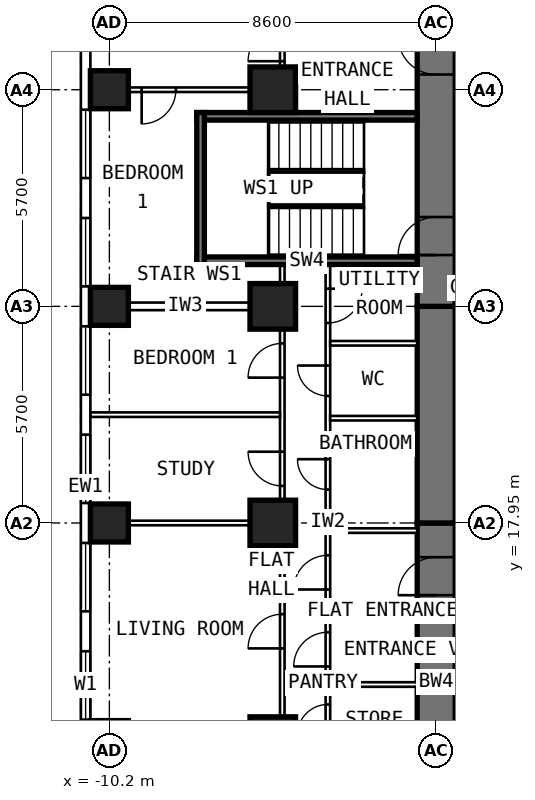
"""IFC4 building model, lengths in metres.
Left out: names, types, materials, properties, quantities, classifications, styles, units other than length and angle.
Written with IfcOpenShell. Run it as: python <this file> out.ifc"""

import sys

from ifc_helpers import new_model, si_unit, direction, frame, frame_2d, origin, origin_2d, place, context, subcontext, project, spatial, rectangle, extrude, element, fill, save


model = new_model("IFC4")
c1 = context("Model", 3, precision=1e-05, world=origin(), true_north=direction((0.0, 1.0)))
c2 = subcontext(c1, "Body", "Model", "MODEL_VIEW")
j1 = project(units=[si_unit("LENGTHUNIT", "METRE"), si_unit("PLANEANGLEUNIT", "RADIAN")], contexts=[c1])
p1 = place(None, origin())
s1 = spatial("IfcSite", under=j1, at=p1, CompositionType="ELEMENT")
p2 = place(p1, origin())
s2 = spatial("IfcBuilding", under=s1, at=p2, CompositionType="ELEMENT")
p3 = place(p2, frame((0.0, 0.0, 57.4)))
s3 = spatial("IfcBuildingStorey", under=s2, at=p3, CompositionType="ELEMENT", Elevation=57.4)
for number, where, z_axis, x_axis in (
    (1, (-10.2, 17.95, 0.0), (0.0, 0.0, 1.0), (0.0, 1.0, 0.0)),
    (2, (-10.2, 23.65, 0.0), (0.0, 0.0, 1.0), (0.0, 1.0, 0.0)),
    (3, (-10.2, 29.35, 0.0), (0.0, 0.0, 1.0), (0.0, 1.0, 0.0)),
):
    element("IfcColumn", number, at=place(p3, frame(where, z_axis=z_axis, x_axis=x_axis)), inside=s3, PredefinedType="COLUMN", context=c2, shape_type="SweptSolid", body=[
        extrude(rectangle(XDim=1.0, YDim=1.0, at=origin_2d()), origin(), (0.0, 0.0, 1.0), 3.6),
    ])
for number, where, z_axis, x_axis in (
    (4, (-5.9, 12.25, 0.0), (0.0, 0.0, 1.0), (0.0, 1.0, 0.0)),
    (5, (-5.9, 17.95, 0.0), (0.0, 0.0, 1.0), (0.0, 1.0, 0.0)),
    (6, (-5.9, 23.65, 0.0), (0.0, 0.0, 1.0), (0.0, 1.0, 0.0)),
    (7, (-5.9, 29.35, 0.0), (0.0, 0.0, 1.0), (0.0, 1.0, 0.0)),
):
    element("IfcColumn", number, at=place(p3, frame(where, z_axis=z_axis, x_axis=x_axis)), inside=s3, PredefinedType="COLUMN", context=c2, shape_type="SweptSolid", body=[
        extrude(rectangle(XDim=1.2, YDim=1.2, at=origin_2d()), origin(), (0.0, 0.0, 1.0), 3.6),
    ])
p4 = place(p3, frame((-1.6, 9.6, 0.0), z_axis=(0.0, 0.0, 1.0), x_axis=(0.0, 1.0, 0.0)))
e8 = element("IfcWall", 8, at=p4, inside=s3, PredefinedType="SHEAR", context=c2, shape_type="SweptSolid", body=[
    extrude(rectangle(XDim=8.35, YDim=1.0, at=frame_2d((4.175, 0.0))), origin(), (0.0, 0.0, 1.0), 3.6),
])
p5 = place(p4, frame((6.45, 0.0, 0.0)))
e9 = element("IfcOpeningElement", 9, at=p5, cuts=e8, PredefinedType="OPENING", context=c2, shape_type="SweptSolid", body=[
    extrude(rectangle(XDim=1.0, YDim=2.1, at=frame_2d((0.5, 1.05))), frame((0.0, 0.512, 0.0), z_axis=(0.0, -1.0, 0.0), x_axis=(1.0, 0.0, 0.0)), (0.0, 0.0, 1.0), 1.024),
])
p6 = place(p3, frame((-1.6, 17.95, 0.0), z_axis=(0.0, 0.0, 1.0), x_axis=(0.0, 1.0, 0.0)))
e10 = element("IfcWall", 10, at=p6, inside=s3, PredefinedType="SHEAR", context=c2, shape_type="SweptSolid", body=[
    extrude(rectangle(XDim=5.7, YDim=1.0, at=frame_2d((2.85, 0.0))), origin(), (0.0, 0.0, 1.0), 3.6),
])
p7 = place(p3, frame((-1.6, 23.65, 0.0), z_axis=(0.0, 0.0, 1.0), x_axis=(0.0, 1.0, 0.0)))
e11 = element("IfcWall", 11, at=p7, inside=s3, PredefinedType="SHEAR", context=c2, shape_type="SweptSolid", body=[
    extrude(rectangle(XDim=10.745, YDim=1.0, at=frame_2d((5.373, 0.0))), origin(), (0.0, 0.0, 1.0), 3.6),
])
p8 = place(p7, frame((6.1, 0.0, 0.0)))
e12 = element("IfcOpeningElement", 12, at=p8, cuts=e11, PredefinedType="OPENING", context=c2, shape_type="SweptSolid", body=[
    extrude(rectangle(XDim=1.0, YDim=2.1, at=frame_2d((0.5, 1.05))), frame((0.0, 0.512, 0.0), z_axis=(0.0, -1.0, 0.0), x_axis=(1.0, 0.0, 0.0)), (0.0, 0.0, 1.0), 1.024),
])
p9 = place(p7, frame((1.35, 0.0, 0.0)))
e13 = element("IfcOpeningElement", 13, at=p9, cuts=e11, PredefinedType="OPENING", context=c2, shape_type="SweptSolid", body=[
    extrude(rectangle(XDim=1.0, YDim=2.1, at=frame_2d((0.5, 1.05))), frame((0.0, 0.512, 0.0), z_axis=(0.0, -1.0, 0.0), x_axis=(1.0, 0.0, 0.0)), (0.0, 0.0, 1.0), 1.024),
])
p10 = place(p3, frame((-10.825, 6.148, 0.0), z_axis=(0.0, 0.0, 1.0), x_axis=(0.0, 1.0, 0.0)))
e14 = element("IfcWall", 14, at=p10, inside=s3, PredefinedType="SOLIDWALL", context=c2, shape_type="SweptSolid", body=[
    extrude(rectangle(XDim=25.487, YDim=0.25, at=frame_2d((12.744, 0.0))), origin(), (0.0, 0.0, 1.0), 3.35),
])
p11 = place(p10, frame((0.927, 0.0, 0.8)))
e15 = element("IfcOpeningElement", 15, at=p11, cuts=e14, PredefinedType="OPENING", context=c2, shape_type="SweptSolid", body=[
    extrude(rectangle(XDim=1.8, YDim=1.8, at=frame_2d((0.9, 0.9))), frame((0.0, 0.137, 0.0), z_axis=(0.0, -1.0, 0.0), x_axis=(1.0, 0.0, 0.0)), (0.0, 0.0, 1.0), 0.274),
])
p12 = place(p10, frame((3.777, 0.0, 0.8)))
e16 = element("IfcOpeningElement", 16, at=p12, cuts=e14, PredefinedType="OPENING", context=c2, shape_type="SweptSolid", body=[
    extrude(rectangle(XDim=1.8, YDim=1.8, at=frame_2d((0.9, 0.9))), frame((0.0, 0.137, 0.0), z_axis=(0.0, -1.0, 0.0), x_axis=(1.0, 0.0, 0.0)), (0.0, 0.0, 1.0), 0.274),
])
p13 = place(p10, frame((6.627, 0.0, 0.8)))
e17 = element("IfcOpeningElement", 17, at=p13, cuts=e14, PredefinedType="OPENING", context=c2, shape_type="SweptSolid", body=[
    extrude(rectangle(XDim=1.8, YDim=1.8, at=frame_2d((0.9, 0.9))), frame((0.0, 0.137, 0.0), z_axis=(0.0, -1.0, 0.0), x_axis=(1.0, 0.0, 0.0)), (0.0, 0.0, 1.0), 0.274),
])
p14 = place(p10, frame((9.477, 0.0, 0.8)))
e18 = element("IfcOpeningElement", 18, at=p14, cuts=e14, PredefinedType="OPENING", context=c2, shape_type="SweptSolid", body=[
    extrude(rectangle(XDim=1.8, YDim=1.8, at=frame_2d((0.9, 0.9))), frame((0.0, 0.137, 0.0), z_axis=(0.0, -1.0, 0.0), x_axis=(1.0, 0.0, 0.0)), (0.0, 0.0, 1.0), 0.274),
])
p15 = place(p10, frame((12.327, 0.0, 0.8)))
e19 = element("IfcOpeningElement", 19, at=p15, cuts=e14, PredefinedType="OPENING", context=c2, shape_type="SweptSolid", body=[
    extrude(rectangle(XDim=1.8, YDim=1.8, at=frame_2d((0.9, 0.9))), frame((0.0, 0.137, 0.0), z_axis=(0.0, -1.0, 0.0), x_axis=(1.0, 0.0, 0.0)), (0.0, 0.0, 1.0), 0.274),
])
p16 = place(p10, frame((15.177, 0.0, 0.8)))
e20 = element("IfcOpeningElement", 20, at=p16, cuts=e14, PredefinedType="OPENING", context=c2, shape_type="SweptSolid", body=[
    extrude(rectangle(XDim=1.8, YDim=1.8, at=frame_2d((0.9, 0.9))), frame((0.0, 0.137, 0.0), z_axis=(0.0, -1.0, 0.0), x_axis=(1.0, 0.0, 0.0)), (0.0, 0.0, 1.0), 0.274),
])
p17 = place(p10, frame((18.027, 0.0, 0.8)))
e21 = element("IfcOpeningElement", 21, at=p17, cuts=e14, PredefinedType="OPENING", context=c2, shape_type="SweptSolid", body=[
    extrude(rectangle(XDim=1.8, YDim=1.8, at=frame_2d((0.9, 0.9))), frame((0.0, 0.137, 0.0), z_axis=(0.0, -1.0, 0.0), x_axis=(1.0, 0.0, 0.0)), (0.0, 0.0, 1.0), 0.274),
])
p18 = place(p10, frame((20.877, 0.0, 0.8)))
e22 = element("IfcOpeningElement", 22, at=p18, cuts=e14, PredefinedType="OPENING", context=c2, shape_type="SweptSolid", body=[
    extrude(rectangle(XDim=1.8, YDim=1.8, at=frame_2d((0.9, 0.9))), frame((0.0, 0.137, 0.0), z_axis=(0.0, -1.0, 0.0), x_axis=(1.0, 0.0, 0.0)), (0.0, 0.0, 1.0), 0.274),
])
p19 = place(p3, frame((-4.45, 10.1, 0.0), z_axis=(0.0, 0.0, 1.0), x_axis=(0.0, 1.0, 0.0)))
e23 = element("IfcWall", 23, at=p19, inside=s3, PredefinedType="PARTITIONING", context=c2, shape_type="SweptSolid", body=[
    extrude(rectangle(XDim=14.65, YDim=0.12, at=frame_2d((7.325, 0.0))), origin(), (0.0, 0.0, 1.0), 3.35),
])
p20 = place(p19, frame((0.375, 0.0, 0.0)))
e24 = element("IfcOpeningElement", 24, at=p20, cuts=e23, PredefinedType="OPENING", context=c2, shape_type="SweptSolid", body=[
    extrude(rectangle(XDim=0.9, YDim=2.1, at=frame_2d((0.45, 1.05))), frame((0.0, 0.072, 0.0), z_axis=(0.0, -1.0, 0.0), x_axis=(1.0, 0.0, 0.0)), (0.0, 0.0, 1.0), 0.144),
])
p21 = place(p19, frame((2.275, 0.0, 0.0)))
e25 = element("IfcOpeningElement", 25, at=p21, cuts=e23, PredefinedType="OPENING", context=c2, shape_type="SweptSolid", body=[
    extrude(rectangle(XDim=0.8, YDim=2.1, at=frame_2d((0.4, 1.05))), frame((0.0, 0.072, 0.0), z_axis=(0.0, -1.0, 0.0), x_axis=(1.0, 0.0, 0.0)), (0.0, 0.0, 1.0), 0.144),
])
p22 = place(p19, frame((4.075, 0.0, 0.0)))
e26 = element("IfcOpeningElement", 26, at=p22, cuts=e23, PredefinedType="OPENING", context=c2, shape_type="SweptSolid", body=[
    extrude(rectangle(XDim=0.9, YDim=2.1, at=frame_2d((0.45, 1.05))), frame((0.0, 0.072, 0.0), z_axis=(0.0, -1.0, 0.0), x_axis=(1.0, 0.0, 0.0)), (0.0, 0.0, 1.0), 0.144),
])
p23 = place(p19, frame((6.1, 0.0, 0.0)))
e27 = element("IfcOpeningElement", 27, at=p23, cuts=e23, PredefinedType="OPENING", context=c2, shape_type="SweptSolid", body=[
    extrude(rectangle(XDim=0.9, YDim=2.1, at=frame_2d((0.45, 1.05))), frame((0.0, 0.072, 0.0), z_axis=(0.0, -1.0, 0.0), x_axis=(1.0, 0.0, 0.0)), (0.0, 0.0, 1.0), 0.144),
])
p24 = place(p19, frame((8.729, 0.0, 0.0)))
e28 = element("IfcOpeningElement", 28, at=p24, cuts=e23, PredefinedType="OPENING", context=c2, shape_type="SweptSolid", body=[
    extrude(rectangle(XDim=0.8, YDim=2.1, at=frame_2d((0.4, 1.05))), frame((0.0, 0.072, 0.0), z_axis=(0.0, -1.0, 0.0), x_axis=(1.0, 0.0, 0.0)), (0.0, 0.0, 1.0), 0.144),
])
p25 = place(p19, frame((11.193, 0.0, 0.0)))
e29 = element("IfcOpeningElement", 29, at=p25, cuts=e23, PredefinedType="OPENING", context=c2, shape_type="SweptSolid", body=[
    extrude(rectangle(XDim=0.8, YDim=2.1, at=frame_2d((0.4, 1.05))), frame((0.0, 0.072, 0.0), z_axis=(0.0, -1.0, 0.0), x_axis=(1.0, 0.0, 0.0)), (0.0, 0.0, 1.0), 0.144),
])
p26 = place(p19, frame((13.114, 0.0, 0.0)))
e30 = element("IfcOpeningElement", 30, at=p26, cuts=e23, PredefinedType="OPENING", context=c2, shape_type="SweptSolid", body=[
    extrude(rectangle(XDim=0.9, YDim=2.1, at=frame_2d((0.45, 1.05))), frame((0.0, 0.072, 0.0), z_axis=(0.0, -1.0, 0.0), x_axis=(1.0, 0.0, 0.0)), (0.0, 0.0, 1.0), 0.144),
])
p27 = place(p3, frame((-5.65, 9.6, 0.0), z_axis=(0.0, 0.0, 1.0), x_axis=(0.0, 1.0, 0.0)))
e31 = element("IfcWall", 31, at=p27, inside=s3, PredefinedType="PARTITIONING", context=c2, shape_type="SweptSolid", body=[
    extrude(rectangle(XDim=15.15, YDim=0.12, at=frame_2d((7.575, 0.0))), origin(), (0.0, 0.0, 1.0), 3.35),
])
p28 = place(p27, frame((5.05, 0.0, 0.0)))
e32 = element("IfcOpeningElement", 32, at=p28, cuts=e31, PredefinedType="OPENING", context=c2, shape_type="SweptSolid", body=[
    extrude(rectangle(XDim=0.9, YDim=2.1, at=frame_2d((0.45, 1.05))), frame((0.0, 0.072, 0.0), z_axis=(0.0, -1.0, 0.0), x_axis=(1.0, 0.0, 0.0)), (0.0, 0.0, 1.0), 0.144),
])
p29 = place(p27, frame((9.325, 0.0, 0.0)))
e33 = element("IfcOpeningElement", 33, at=p29, cuts=e31, PredefinedType="OPENING", context=c2, shape_type="SweptSolid", body=[
    extrude(rectangle(XDim=0.9, YDim=2.1, at=frame_2d((0.45, 1.05))), frame((0.0, 0.072, 0.0), z_axis=(0.0, -1.0, 0.0), x_axis=(1.0, 0.0, 0.0)), (0.0, 0.0, 1.0), 0.144),
])
p30 = place(p27, frame((12.175, 0.0, 0.0)))
e34 = element("IfcOpeningElement", 34, at=p30, cuts=e31, PredefinedType="OPENING", context=c2, shape_type="SweptSolid", body=[
    extrude(rectangle(XDim=0.9, YDim=2.1, at=frame_2d((0.45, 1.05))), frame((0.0, 0.072, 0.0), z_axis=(0.0, -1.0, 0.0), x_axis=(1.0, 0.0, 0.0)), (0.0, 0.0, 1.0), 0.144),
])
p31 = place(p3, frame((-5.71, 17.95, 0.0), z_axis=(0.0, 0.0, 1.0), x_axis=(-1.0, 0.0, 0.0)))
e35 = element("IfcWall", 35, at=p31, inside=s3, PredefinedType="PARTITIONING", context=c2, shape_type="SweptSolid", body=[
    extrude(rectangle(XDim=4.99, YDim=0.12, at=frame_2d((2.495, 0.0))), origin(), (0.0, 0.0, 1.0), 2.45),
])
p32 = place(p3, frame((-5.71, 20.8, 0.0), z_axis=(0.0, 0.0, 1.0), x_axis=(-1.0, 0.0, 0.0)))
e36 = element("IfcWall", 36, at=p32, inside=s3, PredefinedType="PARTITIONING", context=c2, shape_type="SweptSolid", body=[
    extrude(rectangle(XDim=4.99, YDim=0.12, at=frame_2d((2.495, 0.0))), origin(), (0.0, 0.0, 1.0), 3.35),
])
for number, where, z_axis, x_axis in (
    (37, (-2.1, 13.7, 0.0), (0.0, 0.0, 1.0), (-1.0, 0.0, 0.0)),
    (38, (-2.1, 15.55, 0.0), (0.0, 0.0, 1.0), (-1.0, 0.0, 0.0)),
):
    element("IfcWall", number, at=place(p3, frame(where, z_axis=z_axis, x_axis=x_axis)), inside=s3, PredefinedType="PARTITIONING", context=c2, shape_type="SweptSolid", body=[
        extrude(rectangle(XDim=2.29, YDim=0.12, at=frame_2d((1.145, 0.0))), origin(), (0.0, 0.0, 1.0), 3.35),
    ])
p33 = place(p3, frame((-2.1, 17.75, 0.0), z_axis=(0.0, 0.0, 1.0), x_axis=(-1.0, 0.0, 0.0)))
e39 = element("IfcWall", 39, at=p33, inside=s3, PredefinedType="PARTITIONING", context=c2, shape_type="SweptSolid", body=[
    extrude(rectangle(XDim=2.29, YDim=0.12, at=frame_2d((1.145, 0.0))), origin(), (0.0, 0.0, 1.0), 2.45),
])
for number, where, z_axis, x_axis in (
    (40, (-2.1, 20.707, 0.0), (0.0, 0.0, 1.0), (-1.0, 0.0, 0.0)),
    (41, (-2.1, 22.678, 0.0), (0.0, 0.0, 1.0), (-1.0, 0.0, 0.0)),
):
    element("IfcWall", number, at=place(p3, frame(where, z_axis=z_axis, x_axis=x_axis)), inside=s3, PredefinedType="PARTITIONING", context=c2, shape_type="SweptSolid", body=[
        extrude(rectangle(XDim=2.29, YDim=0.12, at=frame_2d((1.145, 0.0))), origin(), (0.0, 0.0, 1.0), 3.35),
    ])
p34 = place(p3, frame((-5.71, 23.65, 0.0), z_axis=(0.0, 0.0, 1.0), x_axis=(-1.0, 0.0, 0.0)))
e42 = element("IfcWall", 42, at=p34, inside=s3, PredefinedType="PARTITIONING", context=c2, shape_type="SweptSolid", body=[
    extrude(rectangle(XDim=4.99, YDim=0.2, at=frame_2d((2.495, 0.0))), origin(), (0.0, 0.0, 1.0), 2.45),
])
p35 = place(p3, frame((-5.71, 29.35, 0.0), z_axis=(0.0, 0.0, 1.0), x_axis=(-1.0, 0.0, 0.0)))
e43 = element("IfcWall", 43, at=p35, inside=s3, PredefinedType="PARTITIONING", context=c2, shape_type="SweptSolid", body=[
    extrude(rectangle(XDim=4.99, YDim=0.12, at=frame_2d((2.495, 0.0))), origin(), (0.0, 0.0, 1.0), 2.45),
])
p36 = place(p35, frame((2.74, 0.0, 0.0)))
e44 = element("IfcOpeningElement", 44, at=p36, cuts=e43, PredefinedType="OPENING", context=c2, shape_type="SweptSolid", body=[
    extrude(rectangle(XDim=0.9, YDim=2.1, at=frame_2d((0.45, 1.05))), frame((0.0, 0.072, 0.0), z_axis=(0.0, -1.0, 0.0), x_axis=(1.0, 0.0, 0.0)), (0.0, 0.0, 1.0), 0.144),
])
p37 = place(p3, frame((-5.65, 28.95, 0.0), z_axis=(0.0, 0.0, 1.0), x_axis=(0.0, 1.0, 0.0)))
e45 = element("IfcWall", 45, at=p37, inside=s3, PredefinedType="PARTITIONING", context=c2, shape_type="SweptSolid", body=[
    extrude(rectangle(XDim=5.445, YDim=0.12, at=frame_2d((2.723, 0.0))), origin(), (0.0, 0.0, 1.0), 3.35),
])
p38 = place(p37, frame((1.15, 0.0, 0.0)))
e46 = element("IfcOpeningElement", 46, at=p38, cuts=e45, PredefinedType="OPENING", context=c2, shape_type="SweptSolid", body=[
    extrude(rectangle(XDim=0.9, YDim=2.1, at=frame_2d((0.45, 1.05))), frame((0.0, 0.072, 0.0), z_axis=(0.0, -1.0, 0.0), x_axis=(1.0, 0.0, 0.0)), (0.0, 0.0, 1.0), 0.144),
])
for number, where, z_axis, x_axis in (
    (47, (-2.1, 24.85, 0.0), (0.0, 0.0, 1.0), (-1.0, 0.0, 0.0)),
    (48, (-2.1, 28.65, 0.0), (0.0, 0.0, 1.0), (-1.0, 0.0, 0.0)),
):
    element("IfcWall", number, at=place(p3, frame(where, z_axis=z_axis, x_axis=x_axis)), inside=s3, PredefinedType="SHEAR", context=c2, shape_type="SweptSolid", body=[
        extrude(rectangle(XDim=5.8, YDim=0.2, at=frame_2d((2.9, 0.0))), origin(), (0.0, 0.0, 1.0), 3.33),
    ])
p39 = place(p3, frame((-7.8, 24.75, 0.0), z_axis=(0.0, 0.0, 1.0), x_axis=(0.0, 1.0, 0.0)))
e49 = element("IfcWall", 49, at=p39, inside=s3, PredefinedType="SHEAR", context=c2, shape_type="SweptSolid", body=[
    extrude(rectangle(XDim=4.0, YDim=0.2, at=frame_2d((2.0, 0.0))), origin(), (0.0, 0.0, 1.0), 3.33),
])
p40 = place(p13, origin())
e50 = element("IfcWindow", 50, at=p40, inside=s3, PartitioningType="SINGLE_PANEL", PredefinedType="WINDOW", context=c2, shape_type="SweptSolid", body=[
    extrude(rectangle(XDim=1.8, YDim=1.8, at=frame_2d((0.9, 0.9))), frame((0.0, 0.03, 0.0), z_axis=(0.0, -1.0, 0.0), x_axis=(1.0, 0.0, 0.0)), (0.0, 0.0, 1.0), 0.06),
])
fill(e17, e50)
p41 = place(p14, origin())
e51 = element("IfcWindow", 51, at=p41, inside=s3, PartitioningType="SINGLE_PANEL", PredefinedType="WINDOW", context=c2, shape_type="SweptSolid", body=[
    extrude(rectangle(XDim=1.8, YDim=1.8, at=frame_2d((0.9, 0.9))), frame((0.0, 0.03, 0.0), z_axis=(0.0, -1.0, 0.0), x_axis=(1.0, 0.0, 0.0)), (0.0, 0.0, 1.0), 0.06),
])
fill(e18, e51)
p42 = place(p15, origin())
e52 = element("IfcWindow", 52, at=p42, inside=s3, PartitioningType="SINGLE_PANEL", PredefinedType="WINDOW", context=c2, shape_type="SweptSolid", body=[
    extrude(rectangle(XDim=1.8, YDim=1.8, at=frame_2d((0.9, 0.9))), frame((0.0, 0.03, 0.0), z_axis=(0.0, -1.0, 0.0), x_axis=(1.0, 0.0, 0.0)), (0.0, 0.0, 1.0), 0.06),
])
fill(e19, e52)
p43 = place(p16, origin())
e53 = element("IfcWindow", 53, at=p43, inside=s3, PartitioningType="SINGLE_PANEL", PredefinedType="WINDOW", context=c2, shape_type="SweptSolid", body=[
    extrude(rectangle(XDim=1.8, YDim=1.8, at=frame_2d((0.9, 0.9))), frame((0.0, 0.03, 0.0), z_axis=(0.0, -1.0, 0.0), x_axis=(1.0, 0.0, 0.0)), (0.0, 0.0, 1.0), 0.06),
])
fill(e20, e53)
p44 = place(p17, origin())
e54 = element("IfcWindow", 54, at=p44, inside=s3, PartitioningType="SINGLE_PANEL", PredefinedType="WINDOW", context=c2, shape_type="SweptSolid", body=[
    extrude(rectangle(XDim=1.8, YDim=1.8, at=frame_2d((0.9, 0.9))), frame((0.0, 0.03, 0.0), z_axis=(0.0, -1.0, 0.0), x_axis=(1.0, 0.0, 0.0)), (0.0, 0.0, 1.0), 0.06),
])
fill(e21, e54)
p45 = place(p18, origin())
e55 = element("IfcWindow", 55, at=p45, inside=s3, PartitioningType="SINGLE_PANEL", PredefinedType="WINDOW", context=c2, shape_type="SweptSolid", body=[
    extrude(rectangle(XDim=1.8, YDim=1.8, at=frame_2d((0.9, 0.9))), frame((0.0, 0.03, 0.0), z_axis=(0.0, -1.0, 0.0), x_axis=(1.0, 0.0, 0.0)), (0.0, 0.0, 1.0), 0.06),
])
fill(e22, e55)
p46 = place(p5, origin())
e56 = element("IfcDoor", 56, at=p46, inside=s3, OperationType="SINGLE_SWING_LEFT", PredefinedType="DOOR", context=c2, shape_type="SweptSolid", body=[
    extrude(rectangle(XDim=1.0, YDim=2.1, at=frame_2d((0.5, 1.05))), frame((0.0, 0.25, 0.0), z_axis=(0.0, -1.0, 0.0), x_axis=(1.0, 0.0, 0.0)), (0.0, 0.0, 1.0), 0.5),
])
fill(e9, e56)
p47 = place(p28, origin())
e57 = element("IfcDoor", 57, at=p47, inside=s3, OperationType="SINGLE_SWING_LEFT", PredefinedType="DOOR", context=c2, shape_type="SweptSolid", body=[
    extrude(rectangle(XDim=0.9, YDim=2.1, at=frame_2d((0.45, 1.05))), frame((0.0, 0.025, 0.0), z_axis=(0.0, -1.0, 0.0), x_axis=(1.0, 0.0, 0.0)), (0.0, 0.0, 1.0), 0.05),
])
fill(e32, e57)
p48 = place(p29, origin())
e58 = element("IfcDoor", 58, at=p48, inside=s3, OperationType="SINGLE_SWING_RIGHT", PredefinedType="DOOR", context=c2, shape_type="SweptSolid", body=[
    extrude(rectangle(XDim=0.9, YDim=2.1, at=frame_2d((0.45, 1.05))), frame((0.0, 0.025, 0.0), z_axis=(0.0, -1.0, 0.0), x_axis=(1.0, 0.0, 0.0)), (0.0, 0.0, 1.0), 0.05),
])
fill(e33, e58)
p49 = place(p30, origin())
e59 = element("IfcDoor", 59, at=p49, inside=s3, OperationType="SINGLE_SWING_LEFT", PredefinedType="DOOR", context=c2, shape_type="SweptSolid", body=[
    extrude(rectangle(XDim=0.9, YDim=2.1, at=frame_2d((0.45, 1.05))), frame((0.0, 0.025, 0.0), z_axis=(0.0, -1.0, 0.0), x_axis=(1.0, 0.0, 0.0)), (0.0, 0.0, 1.0), 0.05),
])
fill(e34, e59)
p50 = place(p21, origin())
e60 = element("IfcDoor", 60, at=p50, inside=s3, OperationType="SINGLE_SWING_LEFT", PredefinedType="DOOR", context=c2, shape_type="SweptSolid", body=[
    extrude(rectangle(XDim=0.8, YDim=2.1, at=frame_2d((0.4, 1.05))), frame((0.0, 0.025, 0.0), z_axis=(0.0, -1.0, 0.0), x_axis=(1.0, 0.0, 0.0)), (0.0, 0.0, 1.0), 0.05),
])
fill(e25, e60)
p51 = place(p22, origin())
e61 = element("IfcDoor", 61, at=p51, inside=s3, OperationType="SINGLE_SWING_LEFT", PredefinedType="DOOR", context=c2, shape_type="SweptSolid", body=[
    extrude(rectangle(XDim=0.9, YDim=2.1, at=frame_2d((0.45, 1.05))), frame((0.0, 0.025, 0.0), z_axis=(0.0, -1.0, 0.0), x_axis=(1.0, 0.0, 0.0)), (0.0, 0.0, 1.0), 0.05),
])
fill(e26, e61)
p52 = place(p23, origin())
e62 = element("IfcDoor", 62, at=p52, inside=s3, OperationType="SINGLE_SWING_LEFT", PredefinedType="DOOR", context=c2, shape_type="SweptSolid", body=[
    extrude(rectangle(XDim=0.9, YDim=2.1, at=frame_2d((0.45, 1.05))), frame((0.0, 0.025, 0.0), z_axis=(0.0, -1.0, 0.0), x_axis=(1.0, 0.0, 0.0)), (0.0, 0.0, 1.0), 0.05),
])
fill(e27, e62)
p53 = place(p24, origin())
e63 = element("IfcDoor", 63, at=p53, inside=s3, OperationType="SINGLE_SWING_RIGHT", PredefinedType="DOOR", context=c2, shape_type="SweptSolid", body=[
    extrude(rectangle(XDim=0.8, YDim=2.1, at=frame_2d((0.4, 1.05))), frame((0.0, 0.025, 0.0), z_axis=(0.0, -1.0, 0.0), x_axis=(1.0, 0.0, 0.0)), (0.0, 0.0, 1.0), 0.05),
])
fill(e28, e63)
p54 = place(p25, origin())
e64 = element("IfcDoor", 64, at=p54, inside=s3, OperationType="SINGLE_SWING_RIGHT", PredefinedType="DOOR", context=c2, shape_type="SweptSolid", body=[
    extrude(rectangle(XDim=0.8, YDim=2.1, at=frame_2d((0.4, 1.05))), frame((0.0, 0.025, 0.0), z_axis=(0.0, -1.0, 0.0), x_axis=(1.0, 0.0, 0.0)), (0.0, 0.0, 1.0), 0.05),
])
fill(e29, e64)
p55 = place(p26, frame((0.9, 0.0, 0.0), z_axis=(0.0, 0.0, 1.0), x_axis=(-1.0, 0.0, 0.0)))
e65 = element("IfcDoor", 65, at=p55, inside=s3, OperationType="SINGLE_SWING_LEFT", PredefinedType="DOOR", context=c2, shape_type="SweptSolid", body=[
    extrude(rectangle(XDim=0.9, YDim=2.1, at=frame_2d((0.45, 1.05))), frame((0.0, 0.025, 0.0), z_axis=(0.0, -1.0, 0.0), x_axis=(1.0, 0.0, 0.0)), (0.0, 0.0, 1.0), 0.05),
])
fill(e30, e65)
p56 = place(p36, origin())
e66 = element("IfcDoor", 66, at=p56, inside=s3, OperationType="SINGLE_SWING_RIGHT", PredefinedType="DOOR", context=c2, shape_type="SweptSolid", body=[
    extrude(rectangle(XDim=0.9, YDim=2.1, at=frame_2d((0.45, 1.05))), frame((0.0, 0.025, 0.0), z_axis=(0.0, -1.0, 0.0), x_axis=(1.0, 0.0, 0.0)), (0.0, 0.0, 1.0), 0.05),
])
fill(e44, e66)
p57 = place(p38, origin())
e67 = element("IfcDoor", 67, at=p57, inside=s3, OperationType="SINGLE_SWING_LEFT", PredefinedType="DOOR", context=c2, shape_type="SweptSolid", body=[
    extrude(rectangle(XDim=0.9, YDim=2.1, at=frame_2d((0.45, 1.05))), frame((0.0, 0.025, 0.0), z_axis=(0.0, -1.0, 0.0), x_axis=(1.0, 0.0, 0.0)), (0.0, 0.0, 1.0), 0.05),
])
fill(e46, e67)
p58 = place(p8, origin())
e68 = element("IfcDoor", 68, at=p58, inside=s3, OperationType="SINGLE_SWING_RIGHT", PredefinedType="DOOR", context=c2, shape_type="SweptSolid", body=[
    extrude(rectangle(XDim=1.0, YDim=2.1, at=frame_2d((0.5, 1.05))), frame((0.0, 0.25, 0.0), z_axis=(0.0, -1.0, 0.0), x_axis=(1.0, 0.0, 0.0)), (0.0, 0.0, 1.0), 0.5),
])
fill(e12, e68)
p59 = place(p9, origin())
e69 = element("IfcDoor", 69, at=p59, inside=s3, OperationType="SINGLE_SWING_LEFT", PredefinedType="DOOR", context=c2, shape_type="SweptSolid", body=[
    extrude(rectangle(XDim=1.0, YDim=2.1, at=frame_2d((0.5, 1.05))), frame((0.0, 0.25, 0.0), z_axis=(0.0, -1.0, 0.0), x_axis=(1.0, 0.0, 0.0)), (0.0, 0.0, 1.0), 0.5),
])
fill(e13, e69)
save(model, sys.argv[1])
